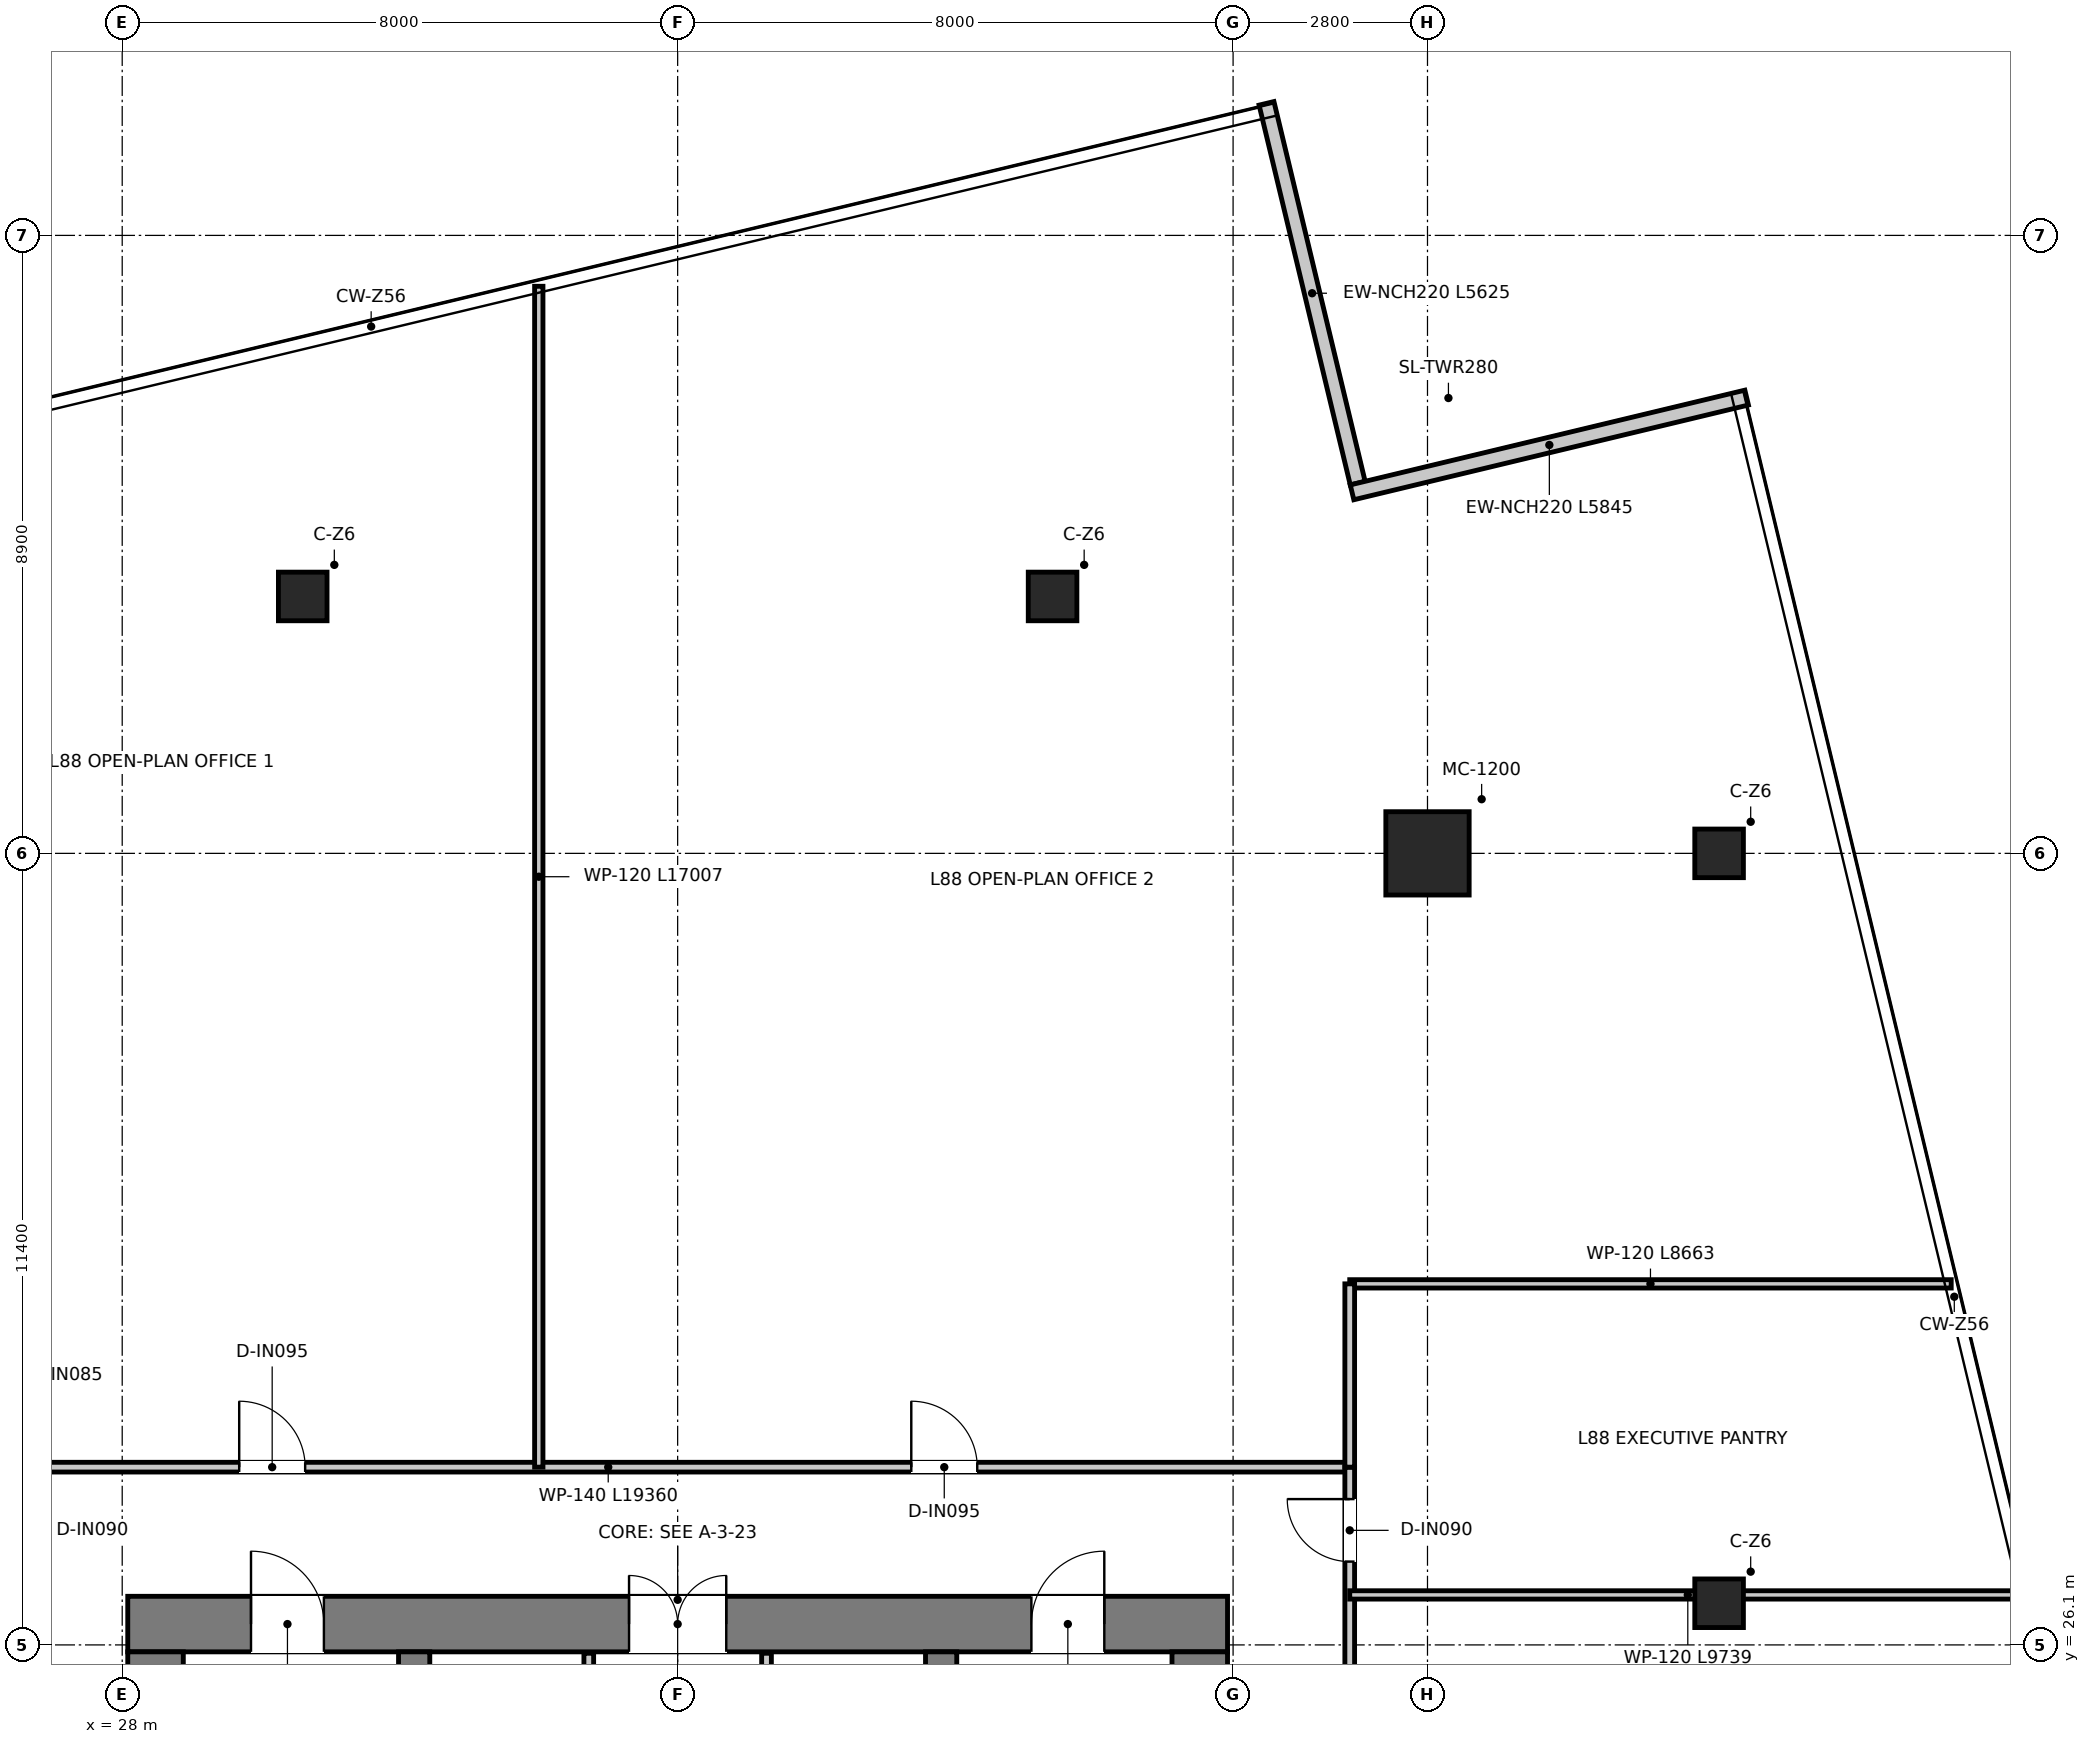
"""IFC4 building model, lengths in metres.
Left out: names, types, materials, properties, quantities, classifications, styles, units other than length and angle.
Written with IfcOpenShell. Run it as: python <this file> out.ifc"""

import sys

from ifc_helpers import new_model, si_unit, direction, frame, frame_2d, origin, origin_2d, place, context, subcontext, project, spatial, rectangle, extrude, source, transform, mapped, element, fill, save


model = new_model("IFC4")
c1 = context("Model", 3, precision=1e-05, world=origin(), true_north=direction((0.0, 1.0)))
c2 = subcontext(c1, "Body", "Model", "MODEL_VIEW")
j1 = project(units=[si_unit("LENGTHUNIT", "METRE"), si_unit("PLANEANGLEUNIT", "RADIAN")], contexts=[c1])
p1 = place(None, origin())
s1 = spatial("IfcSite", under=j1, at=p1, CompositionType="ELEMENT")
p2 = place(p1, origin())
s2 = spatial("IfcBuilding", under=s1, at=p2, CompositionType="ELEMENT")
p3 = place(p2, frame((0.0, 0.0, 359.3)))
s3 = spatial("IfcBuildingStorey", under=s2, at=p3, CompositionType="ELEMENT", Elevation=359.3)
p4 = place(p3, frame((28.08, 26.4, 0.0), z_axis=(0.0, 0.0, 1.0), x_axis=(1.0, 0.0, 0.0)))
e1 = element("IfcWall", 1, at=p4, inside=s3, PredefinedType="SHEAR", context=c2, shape_type="SweptSolid", body=[
    extrude(rectangle(XDim=15.84, YDim=0.8, at=frame_2d((7.92, 0.0))), origin(), (0.0, 0.0, 1.0), 3.95),
])
p5 = place(p4, frame((7.22, 0.0, 0.0)))
e2 = element("IfcOpeningElement", 2, at=p5, cuts=e1, PredefinedType="OPENING", context=c2, shape_type="SweptSolid", body=[
    extrude(rectangle(XDim=1.4, YDim=2.2, at=frame_2d((0.7, 1.1))), frame((0.0, 0.41, 0.0), z_axis=(0.0, -1.0, 0.0), x_axis=(1.0, 0.0, 0.0)), (0.0, 0.0, 1.0), 0.82),
])
p6 = place(p4, frame((1.775, 0.0, 0.0)))
e3 = element("IfcOpeningElement", 3, at=p6, cuts=e1, PredefinedType="OPENING", context=c2, shape_type="SweptSolid", body=[
    extrude(rectangle(XDim=1.05, YDim=2.1, at=frame_2d((0.525, 1.05))), frame((0.0, 0.41, 0.0), z_axis=(0.0, -1.0, 0.0), x_axis=(1.0, 0.0, 0.0)), (0.0, 0.0, 1.0), 0.82),
])
p7 = place(p4, frame((13.015, 0.0, 0.0)))
e4 = element("IfcOpeningElement", 4, at=p7, cuts=e1, PredefinedType="OPENING", context=c2, shape_type="SweptSolid", body=[
    extrude(rectangle(XDim=1.05, YDim=2.1, at=frame_2d((0.525, 1.05))), frame((0.0, 0.41, 0.0), z_axis=(0.0, -1.0, 0.0), x_axis=(1.0, 0.0, 0.0)), (0.0, 0.0, 1.0), 0.82),
])
for number, where, z_axis, x_axis in (
    (5, (28.48, 11.3, 0.0), (0.0, 0.0, 1.0), (0.0, 1.0, 0.0)),
    (6, (43.52, 11.3, 0.0), (0.0, 0.0, 1.0), (0.0, 1.0, 0.0)),
):
    element("IfcWall", number, at=place(p3, frame(where, z_axis=z_axis, x_axis=x_axis)), inside=s3, PredefinedType="SHEAR", context=c2, shape_type="SweptSolid", body=[
        extrude(rectangle(XDim=14.7, YDim=0.8, at=frame_2d((7.35, 0.0))), origin(), (0.0, 0.0, 1.0), 3.95),
    ])
p8 = place(p3, frame((32.205, 13.22, 0.0), z_axis=(0.0, 0.0, 1.0), x_axis=(0.0, 1.0, 0.0)))
e7 = element("IfcWall", 7, at=p8, inside=s3, PredefinedType="SHEAR", context=c2, shape_type="SweptSolid", body=[
    extrude(rectangle(XDim=12.78, YDim=0.45, at=frame_2d((6.39, 0.0))), origin(), (0.0, 0.0, 1.0), 3.95),
])
p9 = place(p8, frame((10.58, 0.0, 0.0)))
e8 = element("IfcOpeningElement", 8, at=p9, cuts=e7, PredefinedType="OPENING", context=c2, shape_type="SweptSolid", body=[
    extrude(rectangle(XDim=1.1, YDim=2.15, at=frame_2d((0.55, 1.075))), frame((0.0, 0.235, 0.0), z_axis=(0.0, -1.0, 0.0), x_axis=(1.0, 0.0, 0.0)), (0.0, 0.0, 1.0), 0.47),
])
p10 = place(p3, frame((39.795, 13.22, 0.0), z_axis=(0.0, 0.0, 1.0), x_axis=(0.0, 1.0, 0.0)))
e9 = element("IfcWall", 9, at=p10, inside=s3, PredefinedType="SHEAR", context=c2, shape_type="SweptSolid", body=[
    extrude(rectangle(XDim=12.78, YDim=0.45, at=frame_2d((6.39, 0.0))), origin(), (0.0, 0.0, 1.0), 3.95),
])
p11 = place(p10, frame((10.58, 0.0, 0.0)))
e10 = element("IfcOpeningElement", 10, at=p11, cuts=e9, PredefinedType="OPENING", context=c2, shape_type="SweptSolid", body=[
    extrude(rectangle(XDim=1.1, YDim=2.15, at=frame_2d((0.55, 1.075))), frame((0.0, 0.235, 0.0), z_axis=(0.0, -1.0, 0.0), x_axis=(1.0, 0.0, 0.0)), (0.0, 0.0, 1.0), 0.47),
])
m1 = source(origin(), c2, "Body", "SweptSolid", [
    extrude(rectangle(XDim=1.2, YDim=1.2, at=origin_2d()), origin(), (0.0, 0.0, 1.0), 3.95),
])
p12 = place(p3, frame((46.8, 37.5, 0.0), z_axis=(0.0, 0.0, 1.0), x_axis=(1.0, 0.0, 0.0)))
e11 = element("IfcColumn", 11, at=p12, inside=s3, PredefinedType="USERDEFINED", context=c2, shape_type="MappedRepresentation", body=[
    mapped(m1, transform((0.0, 0.0, 0.0), x_axis=(1.0, 0.0, 0.0), y_axis=(0.0, 1.0, 0.0), z_axis=(0.0, 0.0, 1.0), scale=1.0)),
])
m2 = source(origin(), c2, "Body", "SweptSolid", [
    extrude(rectangle(XDim=0.7, YDim=0.7, at=origin_2d()), origin(), (0.0, 0.0, 1.0), 3.95),
])
for number, where, z_axis, x_axis in (
    (12, (30.6, 41.2, 0.0), (0.0, 0.0, 1.0), (1.0, 0.0, 0.0)),
    (13, (41.4, 41.2, 0.0), (0.0, 0.0, 1.0), (1.0, 0.0, 0.0)),
    (14, (51.0, 37.5, 0.0), (0.0, 0.0, 1.0), (1.0, 0.0, 0.0)),
    (15, (51.0, 26.7, 0.0), (0.0, 0.0, 1.0), (1.0, 0.0, 0.0)),
):
    element("IfcColumn", number, at=place(p3, frame(where, z_axis=z_axis, x_axis=x_axis)), inside=s3, PredefinedType="COLUMN", context=c2, shape_type="MappedRepresentation", body=[
        mapped(m2, transform((0.0, 0.0, 0.0), x_axis=(1.0, 0.0, 0.0), y_axis=(0.0, 1.0, 0.0), z_axis=(0.0, 0.0, 1.0), scale=1.0)),
    ])
p13 = place(p3, frame((45.795, 42.832, 0.0), z_axis=(0.0, 0.0, 1.0), x_axis=(-0.233466521361, 0.972364840687, 0.0)))
e16 = element("IfcWall", 16, at=p13, inside=s3, PredefinedType="ELEMENTEDWALL", context=c2, shape_type="SweptSolid", body=[
    extrude(rectangle(XDim=5.625, YDim=0.22, at=frame_2d((2.812, 0.0))), origin(), (0.0, 0.0, 1.0), 3.6),
])
p14 = place(p3, frame((51.397, 44.064, 0.0), z_axis=(0.0, 0.0, 1.0), x_axis=(-0.972367961768, -0.233453521986, 0.0)))
e17 = element("IfcWall", 17, at=p14, inside=s3, PredefinedType="ELEMENTEDWALL", context=c2, shape_type="SweptSolid", body=[
    extrude(rectangle(XDim=5.845, YDim=0.22, at=frame_2d((2.922, 0.0))), origin(), (0.0, 0.0, 1.0), 3.6),
])
p15 = place(p3, frame((34.72, 20.2, 0.0), z_axis=(0.0, 0.0, 1.0), x_axis=(0.0, 1.0, 0.0)))
e18 = element("IfcWall", 18, at=p15, inside=s3, PredefinedType="PARTITIONING", context=c2, shape_type="SweptSolid", body=[
    extrude(rectangle(XDim=5.78, YDim=0.14, at=frame_2d((2.89, 0.0))), origin(), (0.0, 0.0, 1.0), 2.75),
])
p16 = place(p15, frame((1.05, 0.0, 0.0)))
e19 = element("IfcOpeningElement", 19, at=p16, cuts=e18, PredefinedType="OPENING", context=c2, shape_type="SweptSolid", body=[
    extrude(rectangle(XDim=0.9, YDim=2.1, at=frame_2d((0.45, 1.05))), frame((0.0, 0.08, 0.0), z_axis=(0.0, -1.0, 0.0), x_axis=(1.0, 0.0, 0.0)), (0.0, 0.0, 1.0), 0.16),
])
p17 = place(p3, frame((37.28, 20.2, 0.0), z_axis=(0.0, 0.0, 1.0), x_axis=(0.0, 1.0, 0.0)))
e20 = element("IfcWall", 20, at=p17, inside=s3, PredefinedType="PARTITIONING", context=c2, shape_type="SweptSolid", body=[
    extrude(rectangle(XDim=5.78, YDim=0.14, at=frame_2d((2.89, 0.0))), origin(), (0.0, 0.0, 1.0), 2.75),
])
p18 = place(p17, frame((0.95, 0.0, 0.0)))
e21 = element("IfcOpeningElement", 21, at=p18, cuts=e20, PredefinedType="OPENING", context=c2, shape_type="SweptSolid", body=[
    extrude(rectangle(XDim=1.1, YDim=2.15, at=frame_2d((0.55, 1.075))), frame((0.0, 0.08, 0.0), z_axis=(0.0, -1.0, 0.0), x_axis=(1.0, 0.0, 0.0)), (0.0, 0.0, 1.0), 0.16),
])
p19 = place(p3, frame((26.32, 28.66, 0.0), z_axis=(0.0, 0.0, 1.0), x_axis=(1.0, 0.0, 0.0)))
e22 = element("IfcWall", 22, at=p19, inside=s3, PredefinedType="PARTITIONING", context=c2, shape_type="SweptSolid", body=[
    extrude(rectangle(XDim=19.36, YDim=0.14, at=frame_2d((9.68, 0.0))), origin(), (0.0, 0.0, 1.0), 3.11),
])
p20 = place(p19, frame((3.365, 0.0, 0.0)))
e23 = element("IfcOpeningElement", 23, at=p20, cuts=e22, PredefinedType="OPENING", context=c2, shape_type="SweptSolid", body=[
    extrude(rectangle(XDim=0.95, YDim=2.1, at=frame_2d((0.475, 1.05))), frame((0.0, 0.08, 0.0), z_axis=(0.0, -1.0, 0.0), x_axis=(1.0, 0.0, 0.0)), (0.0, 0.0, 1.0), 0.16),
])
p21 = place(p19, frame((13.045, 0.0, 0.0)))
e24 = element("IfcOpeningElement", 24, at=p21, cuts=e22, PredefinedType="OPENING", context=c2, shape_type="SweptSolid", body=[
    extrude(rectangle(XDim=0.95, YDim=2.1, at=frame_2d((0.475, 1.05))), frame((0.0, 0.08, 0.0), z_axis=(0.0, -1.0, 0.0), x_axis=(1.0, 0.0, 0.0)), (0.0, 0.0, 1.0), 0.16),
])
p22 = place(p3, frame((45.68, 13.0, 0.0), z_axis=(0.0, 0.0, 1.0), x_axis=(0.0, 1.0, 0.0)))
e25 = element("IfcWall", 25, at=p22, inside=s3, PredefinedType="PARTITIONING", context=c2, shape_type="SweptSolid", body=[
    extrude(rectangle(XDim=15.66, YDim=0.14, at=frame_2d((7.83, 0.0))), origin(), (0.0, 0.0, 1.0), 3.06),
])
p23 = place(p22, frame((14.3, 0.0, 0.0)))
e26 = element("IfcOpeningElement", 26, at=p23, cuts=e25, PredefinedType="OPENING", context=c2, shape_type="SweptSolid", body=[
    extrude(rectangle(XDim=0.9, YDim=2.1, at=frame_2d((0.45, 1.05))), frame((0.0, 0.08, 0.0), z_axis=(0.0, -1.0, 0.0), x_axis=(1.0, 0.0, 0.0)), (0.0, 0.0, 1.0), 0.16),
])
p24 = place(p22, frame((6.55, 0.0, 0.0)))
e27 = element("IfcOpeningElement", 27, at=p24, cuts=e25, PredefinedType="OPENING", context=c2, shape_type="SweptSolid", body=[
    extrude(rectangle(XDim=0.9, YDim=2.1, at=frame_2d((0.45, 1.05))), frame((0.0, 0.08, 0.0), z_axis=(0.0, -1.0, 0.0), x_axis=(1.0, 0.0, 0.0)), (0.0, 0.0, 1.0), 0.16),
])
p25 = place(p22, frame((11.21, 0.0, 0.0)))
e28 = element("IfcOpeningElement", 28, at=p25, cuts=e25, PredefinedType="OPENING", context=c2, shape_type="SweptSolid", body=[
    extrude(rectangle(XDim=0.9, YDim=2.1, at=frame_2d((0.45, 1.05))), frame((0.0, 0.08, 0.0), z_axis=(0.0, -1.0, 0.0), x_axis=(1.0, 0.0, 0.0)), (0.0, 0.0, 1.0), 0.16),
])
p26 = place(p3, frame((45.68, 26.82, 0.0), z_axis=(0.0, 0.0, 1.0), x_axis=(1.0, 0.0, 0.0)))
e29 = element("IfcWall", 29, at=p26, inside=s3, PredefinedType="PARTITIONING", context=c2, shape_type="SweptSolid", body=[
    extrude(rectangle(XDim=9.739, YDim=0.12, at=frame_2d((4.869, 0.0))), origin(), (0.0, 0.0, 1.0), 3.06),
])
p27 = place(p3, frame((45.68, 31.3, 0.0), z_axis=(0.0, 0.0, 1.0), x_axis=(1.0, 0.0, 0.0)))
e30 = element("IfcWall", 30, at=p27, inside=s3, PredefinedType="PARTITIONING", context=c2, shape_type="SweptSolid", body=[
    extrude(rectangle(XDim=8.663, YDim=0.12, at=frame_2d((4.332, 0.0))), origin(), (0.0, 0.0, 1.0), 3.06),
])
p28 = place(p3, frame((45.68, 28.66, 0.0), z_axis=(0.0, 0.0, 1.0), x_axis=(0.0, 1.0, 0.0)))
e31 = element("IfcWall", 31, at=p28, inside=s3, PredefinedType="PARTITIONING", context=c2, shape_type="SweptSolid", body=[
    extrude(rectangle(XDim=2.64, YDim=0.14, at=frame_2d((1.32, 0.0))), origin(), (0.0, 0.0, 1.0), 3.36),
])
p29 = place(p3, frame((34.0, 28.66, 0.0), z_axis=(0.0, 0.0, 1.0), x_axis=(0.0, 1.0, 0.0)))
e32 = element("IfcWall", 32, at=p29, inside=s3, PredefinedType="PARTITIONING", context=c2, shape_type="SweptSolid", body=[
    extrude(rectangle(XDim=17.007, YDim=0.12, at=frame_2d((8.504, 0.0))), origin(), (0.0, 0.0, 1.0), 3.06),
])
p30 = place(p5, origin())
e33 = element("IfcDoor", 33, at=p30, inside=s3, OperationType="DOUBLE_DOOR_SINGLE_SWING", PredefinedType="DOOR", context=c2, shape_type="SweptSolid", body=[
    extrude(rectangle(XDim=1.4, YDim=2.2, at=frame_2d((0.7, 1.1))), frame((0.0, 0.025, 0.0), z_axis=(0.0, -1.0, 0.0), x_axis=(1.0, 0.0, 0.0)), (0.0, 0.0, 1.0), 0.05),
])
fill(e2, e33)
p31 = place(p6, origin())
e34 = element("IfcDoor", 34, at=p31, inside=s3, OperationType="SINGLE_SWING_LEFT", PredefinedType="DOOR", context=c2, shape_type="SweptSolid", body=[
    extrude(rectangle(XDim=1.05, YDim=2.1, at=frame_2d((0.525, 1.05))), frame((0.0, 0.025, 0.0), z_axis=(0.0, -1.0, 0.0), x_axis=(1.0, 0.0, 0.0)), (0.0, 0.0, 1.0), 0.05),
])
fill(e3, e34)
p32 = place(p7, origin())
e35 = element("IfcDoor", 35, at=p32, inside=s3, OperationType="SINGLE_SWING_RIGHT", PredefinedType="DOOR", context=c2, shape_type="SweptSolid", body=[
    extrude(rectangle(XDim=1.05, YDim=2.1, at=frame_2d((0.525, 1.05))), frame((0.0, 0.025, 0.0), z_axis=(0.0, -1.0, 0.0), x_axis=(1.0, 0.0, 0.0)), (0.0, 0.0, 1.0), 0.05),
])
fill(e4, e35)
p33 = place(p23, origin())
e36 = element("IfcDoor", 36, at=p33, inside=s3, OperationType="SINGLE_SWING_RIGHT", PredefinedType="DOOR", context=c2, shape_type="SweptSolid", body=[
    extrude(rectangle(XDim=0.9, YDim=2.1, at=frame_2d((0.45, 1.05))), frame((0.0, 0.025, 0.0), z_axis=(0.0, -1.0, 0.0), x_axis=(1.0, 0.0, 0.0)), (0.0, 0.0, 1.0), 0.05),
])
fill(e26, e36)
p34 = place(p20, origin())
e37 = element("IfcDoor", 37, at=p34, inside=s3, OperationType="SINGLE_SWING_LEFT", PredefinedType="DOOR", context=c2, shape_type="SweptSolid", body=[
    extrude(rectangle(XDim=0.95, YDim=2.1, at=frame_2d((0.475, 1.05))), frame((0.0, 0.025, 0.0), z_axis=(0.0, -1.0, 0.0), x_axis=(1.0, 0.0, 0.0)), (0.0, 0.0, 1.0), 0.05),
])
fill(e23, e37)
p35 = place(p21, origin())
e38 = element("IfcDoor", 38, at=p35, inside=s3, OperationType="SINGLE_SWING_LEFT", PredefinedType="DOOR", context=c2, shape_type="SweptSolid", body=[
    extrude(rectangle(XDim=0.95, YDim=2.1, at=frame_2d((0.475, 1.05))), frame((0.0, 0.025, 0.0), z_axis=(0.0, -1.0, 0.0), x_axis=(1.0, 0.0, 0.0)), (0.0, 0.0, 1.0), 0.05),
])
fill(e24, e38)
save(model, sys.argv[1])
